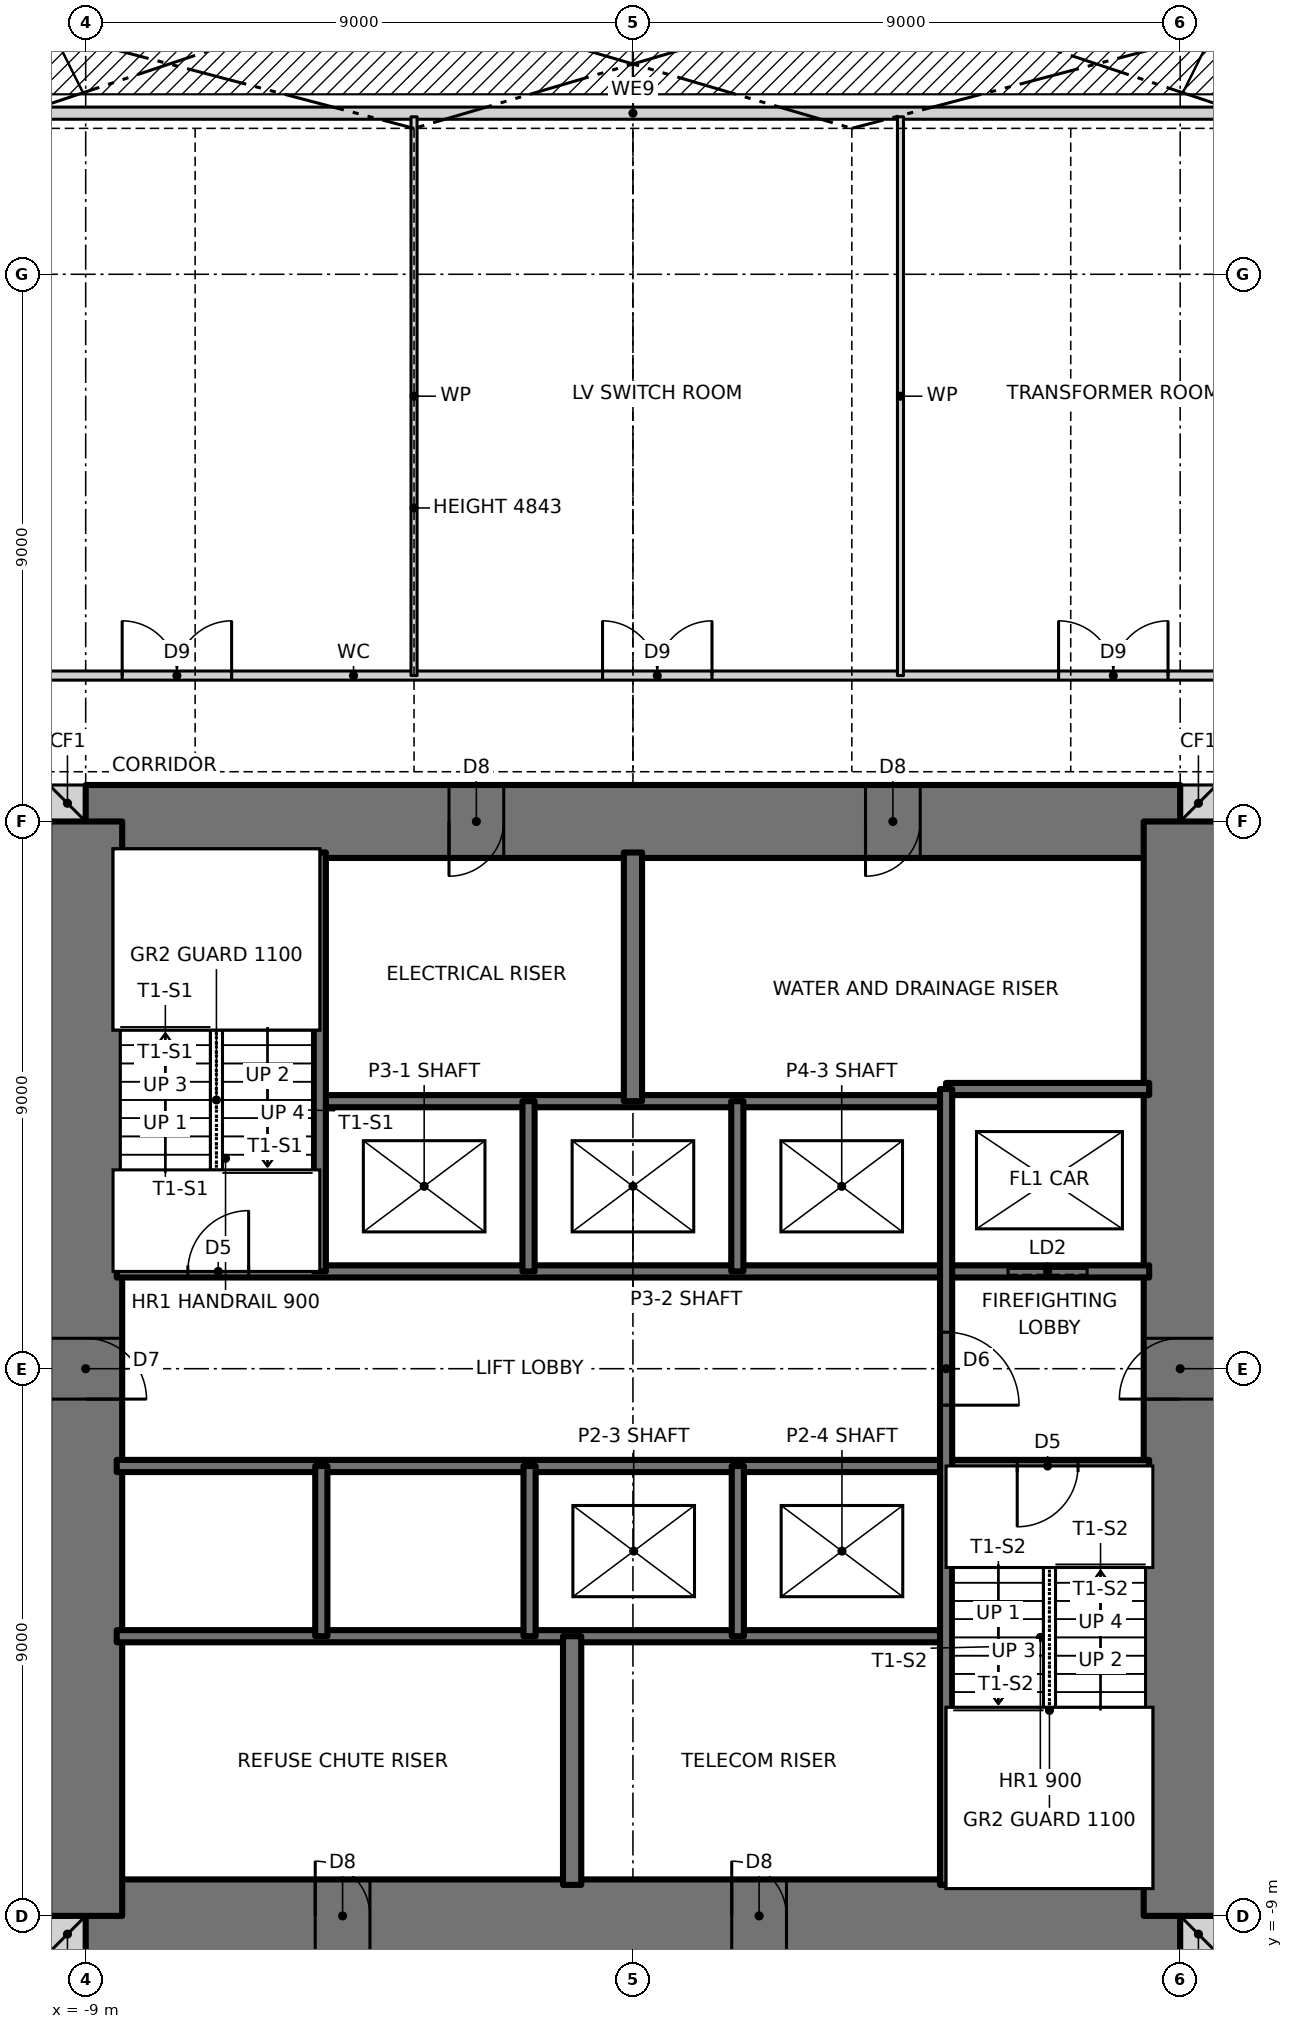
"""IFC4 building model, lengths in metres.
Left out: names, types, materials, properties, quantities, classifications, styles, units other than length and angle.
Written with IfcOpenShell. Run it as: python <this file> out.ifc"""

import sys

from ifc_helpers import new_model, si_unit, direction, frame, frame_2d, origin, origin_2d, place, context, subcontext, project, spatial, rectangle, hollow_rectangle, extrude, clip, halfspace, element, fill, save


model = new_model("IFC4")
c1 = context("Model", 3, precision=1e-05, world=origin(), true_north=direction((0.0, 1.0)))
c2 = subcontext(c1, "Body", "Model", "MODEL_VIEW")
j1 = project(units=[si_unit("LENGTHUNIT", "METRE"), si_unit("PLANEANGLEUNIT", "RADIAN")], contexts=[c1])
p1 = place(None, origin())
s1 = spatial("IfcSite", under=j1, at=p1, CompositionType="ELEMENT")
p2 = place(p1, origin())
s2 = spatial("IfcBuilding", under=s1, at=p2, CompositionType="ELEMENT")
p3 = place(p2, frame((0.0, 0.0, 74.5)))
s3 = spatial("IfcBuildingStorey", under=s2, at=p3, CompositionType="ELEMENT", Elevation=74.5)
p4 = place(p3, frame((4.05, 22.65, 0.0), z_axis=(-0.070044605522, -0.350261033367, 0.934029422311), x_axis=(0.980584767795, -0.196095673508, 0.0)))
e1 = element("IfcColumn", 1, at=p4, inside=s3, PredefinedType="COLUMN", context=c2, shape_type="Clipping", body=[
    clip(clip(extrude(hollow_rectangle(XDim=0.8, YDim=0.8, WallThickness=0.09, at=origin_2d()), origin(), (0.0, 0.0, 1.0), 6.424), halfspace(frame((0.0, 0.0, 0.0), z_axis=(0.0, -0.357196078167, -0.934029422311), x_axis=(0.980584767795, 0.183159128644, -0.070044605522)), False)), halfspace(frame((0.0, 2.143, 5.604), z_axis=(0.0, 0.357196078167, 0.934029422311), x_axis=(0.980584767795, 0.183159128644, -0.070044605522)), False)),
])
p5 = place(p3, frame((-4.05, 22.65, 0.0), z_axis=(0.070044605522, -0.350261033367, 0.934029422311), x_axis=(0.980584767795, 0.196095673508, 0.0)))
e2 = element("IfcColumn", 2, at=p5, inside=s3, PredefinedType="COLUMN", context=c2, shape_type="Clipping", body=[
    clip(clip(extrude(hollow_rectangle(XDim=0.8, YDim=0.8, WallThickness=0.09, at=origin_2d()), origin(), (0.0, 0.0, 1.0), 6.424), halfspace(frame((0.0, 0.0, 0.0), z_axis=(0.0, -0.357196078167, -0.934029422311), x_axis=(0.980584767795, -0.183159128644, 0.070044605522)), False)), halfspace(frame((0.0, 2.143, 5.604), z_axis=(0.0, 0.357196078167, 0.934029422311), x_axis=(0.980584767795, -0.183159128644, 0.070044605522)), False)),
])
for number, where, z_axis, x_axis in (
    (3, (-9.6, -9.3, 0.0), (0.0, 0.0, 1.0), (1.0, 0.0, 0.0)),
    (4, (9.0, -9.3, 0.0), (0.0, 0.0, 1.0), (1.0, 0.0, 0.0)),
    (5, (9.0, 9.3, 0.0), (0.0, 0.0, 1.0), (1.0, 0.0, 0.0)),
    (6, (-9.6, 9.3, 0.0), (0.0, 0.0, 1.0), (1.0, 0.0, 0.0)),
):
    element("IfcWall", number, at=place(p3, frame(where, z_axis=z_axis, x_axis=x_axis)), inside=s3, PredefinedType="SOLIDWALL", context=c2, shape_type="SweptSolid", body=[
        extrude(rectangle(XDim=0.6, YDim=0.6, at=frame_2d((0.3, 0.0))), origin(), (0.0, 0.0, 1.0), 6.0),
    ])
p6 = place(p3, frame((-9.0, -9.0, 0.0), z_axis=(0.0, 0.0, 1.0), x_axis=(1.0, 0.0, 0.0)))
e7 = element("IfcWall", 7, at=p6, inside=s3, PredefinedType="SHEAR", context=c2, shape_type="SweptSolid", body=[
    extrude(rectangle(XDim=18.0, YDim=1.2, at=frame_2d((9.0, 0.0))), origin(), (0.0, 0.0, 1.0), 6.0),
])
p7 = place(p6, frame((3.775, 0.0, 0.0)))
e8 = element("IfcOpeningElement", 8, at=p7, cuts=e7, PredefinedType="OPENING", context=c2, shape_type="SweptSolid", body=[
    extrude(rectangle(XDim=0.9, YDim=2.1, at=frame_2d((0.45, 1.05))), frame((0.0, 0.61, 0.0), z_axis=(0.0, -1.0, 0.0), x_axis=(1.0, 0.0, 0.0)), (0.0, 0.0, 1.0), 1.22),
])
p8 = place(p6, frame((10.625, 0.0, 0.0)))
e9 = element("IfcOpeningElement", 9, at=p8, cuts=e7, PredefinedType="OPENING", context=c2, shape_type="SweptSolid", body=[
    extrude(rectangle(XDim=0.9, YDim=2.1, at=frame_2d((0.45, 1.05))), frame((0.0, 0.61, 0.0), z_axis=(0.0, -1.0, 0.0), x_axis=(1.0, 0.0, 0.0)), (0.0, 0.0, 1.0), 1.22),
])
p9 = place(p3, frame((9.0, 9.0, 0.0), z_axis=(0.0, 0.0, 1.0), x_axis=(-1.0, 0.0, 0.0)))
e10 = element("IfcWall", 10, at=p9, inside=s3, PredefinedType="SHEAR", context=c2, shape_type="SweptSolid", body=[
    extrude(rectangle(XDim=18.0, YDim=1.2, at=frame_2d((9.0, 0.0))), origin(), (0.0, 0.0, 1.0), 6.0),
])
p10 = place(p9, frame((11.125, 0.0, 0.0)))
e11 = element("IfcOpeningElement", 11, at=p10, cuts=e10, PredefinedType="OPENING", context=c2, shape_type="SweptSolid", body=[
    extrude(rectangle(XDim=0.9, YDim=2.1, at=frame_2d((0.45, 1.05))), frame((0.0, 0.61, 0.0), z_axis=(0.0, -1.0, 0.0), x_axis=(1.0, 0.0, 0.0)), (0.0, 0.0, 1.0), 1.22),
])
p11 = place(p9, frame((4.275, 0.0, 0.0)))
e12 = element("IfcOpeningElement", 12, at=p11, cuts=e10, PredefinedType="OPENING", context=c2, shape_type="SweptSolid", body=[
    extrude(rectangle(XDim=0.9, YDim=2.1, at=frame_2d((0.45, 1.05))), frame((0.0, 0.61, 0.0), z_axis=(0.0, -1.0, 0.0), x_axis=(1.0, 0.0, 0.0)), (0.0, 0.0, 1.0), 1.22),
])
p12 = place(p3, frame((9.0, -9.0, 0.0), z_axis=(0.0, 0.0, 1.0), x_axis=(0.0, 1.0, 0.0)))
e13 = element("IfcWall", 13, at=p12, inside=s3, PredefinedType="SHEAR", context=c2, shape_type="SweptSolid", body=[
    extrude(rectangle(XDim=18.0, YDim=1.2, at=frame_2d((9.0, 0.0))), origin(), (0.0, 0.0, 1.0), 6.0),
])
p13 = place(p12, frame((8.5, 0.0, 0.0)))
e14 = element("IfcOpeningElement", 14, at=p13, cuts=e13, PredefinedType="OPENING", context=c2, shape_type="SweptSolid", body=[
    extrude(rectangle(XDim=1.0, YDim=2.1, at=frame_2d((0.5, 1.05))), frame((0.0, 0.61, 0.0), z_axis=(0.0, -1.0, 0.0), x_axis=(1.0, 0.0, 0.0)), (0.0, 0.0, 1.0), 1.22),
])
p14 = place(p3, frame((-9.0, 9.0, 0.0), z_axis=(0.0, 0.0, 1.0), x_axis=(0.0, -1.0, 0.0)))
e15 = element("IfcWall", 15, at=p14, inside=s3, PredefinedType="SHEAR", context=c2, shape_type="SweptSolid", body=[
    extrude(rectangle(XDim=18.0, YDim=1.2, at=frame_2d((9.0, 0.0))), origin(), (0.0, 0.0, 1.0), 6.0),
])
p15 = place(p14, frame((8.5, 0.0, 0.0)))
e16 = element("IfcOpeningElement", 16, at=p15, cuts=e15, PredefinedType="OPENING", context=c2, shape_type="SweptSolid", body=[
    extrude(rectangle(XDim=1.0, YDim=2.1, at=frame_2d((0.5, 1.05))), frame((0.0, 0.61, 0.0), z_axis=(0.0, -1.0, 0.0), x_axis=(1.0, 0.0, 0.0)), (0.0, 0.0, 1.0), 1.22),
])
p16 = place(p3, frame((17.795, 20.65, 0.0), z_axis=(0.0, 0.0, 1.0), x_axis=(-1.0, 0.0, 0.0)))
e17 = element("IfcWall", 17, at=p16, inside=s3, PredefinedType="PARTITIONING", context=c2, shape_type="SweptSolid", body=[
    extrude(rectangle(XDim=35.59, YDim=0.2, at=frame_2d((17.795, 0.0))), origin(), (0.0, 0.0, 1.0), 5.7),
])
p17 = place(p3, frame((-8.49, -4.4, 0.0), z_axis=(0.0, 0.0, 1.0), x_axis=(1.0, 0.0, 0.0)))
e18 = element("IfcWall", 18, at=p17, inside=s3, PredefinedType="SOLIDWALL", context=c2, shape_type="SweptSolid", body=[
    extrude(rectangle(XDim=13.64, YDim=0.2, at=frame_2d((6.82, 0.0))), origin(), (0.0, 0.0, 1.0), 6.0),
])
p18 = place(p3, frame((-8.49, -1.6, 0.0), z_axis=(0.0, 0.0, 1.0), x_axis=(1.0, 0.0, 0.0)))
e19 = element("IfcWall", 19, at=p18, inside=s3, PredefinedType="SOLIDWALL", context=c2, shape_type="SweptSolid", body=[
    extrude(rectangle(XDim=16.98, YDim=0.2, at=frame_2d((8.49, 0.0))), origin(), (0.0, 0.0, 1.0), 6.0),
])
p19 = place(p18, frame((14.81, 0.0, 0.0)))
e20 = element("IfcOpeningElement", 20, at=p19, cuts=e19, PredefinedType="OPENING", context=c2, shape_type="SweptSolid", body=[
    extrude(rectangle(XDim=1.0, YDim=2.1, at=frame_2d((0.5, 1.05))), frame((0.0, 0.11, 0.0), z_axis=(0.0, -1.0, 0.0), x_axis=(1.0, 0.0, 0.0)), (0.0, 0.0, 1.0), 0.22),
])
p20 = place(p3, frame((-8.49, 1.6, 0.0), z_axis=(0.0, 0.0, 1.0), x_axis=(1.0, 0.0, 0.0)))
e21 = element("IfcWall", 21, at=p20, inside=s3, PredefinedType="SOLIDWALL", context=c2, shape_type="SweptSolid", body=[
    extrude(rectangle(XDim=16.98, YDim=0.2, at=frame_2d((8.49, 0.0))), origin(), (0.0, 0.0, 1.0), 6.0),
])
p21 = place(p20, frame((1.17, 0.0, 0.0)))
e22 = element("IfcOpeningElement", 22, at=p21, cuts=e21, PredefinedType="OPENING", context=c2, shape_type="SweptSolid", body=[
    extrude(rectangle(XDim=1.0, YDim=2.1, at=frame_2d((0.5, 1.05))), frame((0.0, 0.11, 0.0), z_axis=(0.0, -1.0, 0.0), x_axis=(1.0, 0.0, 0.0)), (0.0, 0.0, 1.0), 0.22),
])
p22 = place(p20, frame((14.66, 0.0, 0.0)))
e23 = element("IfcOpeningElement", 23, at=p22, cuts=e21, PredefinedType="OPENING", context=c2, shape_type="SweptSolid", body=[
    extrude(rectangle(XDim=1.3, YDim=2.1, at=frame_2d((0.65, 1.05))), frame((0.0, 0.11, 0.0), z_axis=(0.0, -1.0, 0.0), x_axis=(1.0, 0.0, 0.0)), (0.0, 0.0, 1.0), 0.22),
])
p23 = place(p3, frame((-5.15, 4.4, 0.0), z_axis=(0.0, 0.0, 1.0), x_axis=(1.0, 0.0, 0.0)))
e24 = element("IfcWall", 24, at=p23, inside=s3, PredefinedType="SOLIDWALL", context=c2, shape_type="SweptSolid", body=[
    extrude(rectangle(XDim=10.3, YDim=0.2, at=frame_2d((5.15, 0.0))), origin(), (0.0, 0.0, 1.0), 6.0),
])
p24 = place(p3, frame((5.15, 4.6, 0.0), z_axis=(0.0, 0.0, 1.0), x_axis=(1.0, 0.0, 0.0)))
e25 = element("IfcWall", 25, at=p24, inside=s3, PredefinedType="SOLIDWALL", context=c2, shape_type="SweptSolid", body=[
    extrude(rectangle(XDim=3.34, YDim=0.2, at=frame_2d((1.67, 0.0))), origin(), (0.0, 0.0, 1.0), 6.0),
])
p25 = place(p3, frame((-20.59, 11.4, 0.0), z_axis=(0.0, 0.0, 1.0), x_axis=(1.0, 0.0, 0.0)))
e26 = element("IfcWall", 26, at=p25, inside=s3, PredefinedType="PARTITIONING", context=c2, shape_type="SweptSolid", body=[
    extrude(rectangle(XDim=31.99, YDim=0.15, at=frame_2d((15.995, 0.0))), origin(), (0.0, 0.0, 1.0), 5.77),
])
p26 = place(p25, frame((27.59, 0.0, 0.0)))
e27 = element("IfcOpeningElement", 27, at=p26, cuts=e26, PredefinedType="OPENING", context=c2, shape_type="SweptSolid", body=[
    extrude(rectangle(XDim=1.8, YDim=2.1, at=frame_2d((0.9, 1.05))), frame((0.0, 0.085, 0.0), z_axis=(0.0, -1.0, 0.0), x_axis=(1.0, 0.0, 0.0)), (0.0, 0.0, 1.0), 0.17),
])
p27 = place(p25, frame((20.09, 0.0, 0.0)))
e28 = element("IfcOpeningElement", 28, at=p27, cuts=e26, PredefinedType="OPENING", context=c2, shape_type="SweptSolid", body=[
    extrude(rectangle(XDim=1.8, YDim=2.1, at=frame_2d((0.9, 1.05))), frame((0.0, 0.085, 0.0), z_axis=(0.0, -1.0, 0.0), x_axis=(1.0, 0.0, 0.0)), (0.0, 0.0, 1.0), 0.17),
])
p28 = place(p25, frame((12.19, 0.0, 0.0)))
e29 = element("IfcOpeningElement", 29, at=p28, cuts=e26, PredefinedType="OPENING", context=c2, shape_type="SweptSolid", body=[
    extrude(rectangle(XDim=1.8, YDim=2.1, at=frame_2d((0.9, 1.05))), frame((0.0, 0.085, 0.0), z_axis=(0.0, -1.0, 0.0), x_axis=(1.0, 0.0, 0.0)), (0.0, 0.0, 1.0), 0.17),
])
p29 = place(p3, frame((5.15, -8.49, 0.0), z_axis=(0.0, 0.0, 1.0), x_axis=(0.0, 1.0, 0.0)))
e30 = element("IfcWall", 30, at=p29, inside=s3, PredefinedType="SOLIDWALL", context=c2, shape_type="SweptSolid", body=[
    extrude(rectangle(XDim=13.09, YDim=0.2, at=frame_2d((6.545, 0.0))), origin(), (0.0, 0.0, 1.0), 6.0),
])
p30 = place(p29, frame((7.89, 0.0, 0.0)))
e31 = element("IfcOpeningElement", 31, at=p30, cuts=e30, PredefinedType="OPENING", context=c2, shape_type="SweptSolid", body=[
    extrude(rectangle(XDim=1.2, YDim=2.1, at=frame_2d((0.6, 1.05))), frame((0.0, 0.11, 0.0), z_axis=(0.0, -1.0, 0.0), x_axis=(1.0, 0.0, 0.0)), (0.0, 0.0, 1.0), 0.22),
])
p31 = place(p3, frame((4.4, 11.4, 0.0), z_axis=(0.0, 0.0, 1.0), x_axis=(0.0, 1.0, 0.0)))
e32 = element("IfcWall", 32, at=p31, inside=s3, PredefinedType="PARTITIONING", context=c2, shape_type="SweptSolid", body=[
    extrude(rectangle(XDim=9.19, YDim=0.1, at=frame_2d((4.595, 0.0))), origin(), (0.0, 0.0, 1.0), 5.77),
])
for number, where, z_axis, x_axis in (
    (33, (1.725, -4.4, 0.0), (0.0, 0.0, 1.0), (0.0, 1.0, 0.0)),
    (34, (1.717, 1.6, 0.0), (0.0, 0.0, 1.0), (0.0, 1.0, 0.0)),
):
    element("IfcWall", number, at=place(p3, frame(where, z_axis=z_axis, x_axis=x_axis)), inside=s3, PredefinedType="SOLIDWALL", context=c2, shape_type="SweptSolid", body=[
        extrude(rectangle(XDim=2.8, YDim=0.2, at=frame_2d((1.4, 0.0))), origin(), (0.0, 0.0, 1.0), 6.0),
    ])
for number, where, z_axis, x_axis in (
    (35, (0.0, 4.4, 0.0), (0.0, 0.0, 1.0), (0.0, 1.0, 0.0)),
    (36, (-1.0, -8.49, 0.0), (0.0, 0.0, 1.0), (0.0, 1.0, 0.0)),
):
    element("IfcWall", number, at=place(p3, frame(where, z_axis=z_axis, x_axis=x_axis)), inside=s3, PredefinedType="SOLIDWALL", context=c2, shape_type="SweptSolid", body=[
        extrude(rectangle(XDim=4.09, YDim=0.3, at=frame_2d((2.045, 0.0))), origin(), (0.0, 0.0, 1.0), 6.0),
    ])
for number, where, z_axis, x_axis in (
    (37, (-1.7, -4.4, 0.0), (0.0, 0.0, 1.0), (0.0, 1.0, 0.0)),
    (38, (-1.717, 1.6, 0.0), (0.0, 0.0, 1.0), (0.0, 1.0, 0.0)),
):
    element("IfcWall", number, at=place(p3, frame(where, z_axis=z_axis, x_axis=x_axis)), inside=s3, PredefinedType="SOLIDWALL", context=c2, shape_type="SweptSolid", body=[
        extrude(rectangle(XDim=2.8, YDim=0.2, at=frame_2d((1.4, 0.0))), origin(), (0.0, 0.0, 1.0), 6.0),
    ])
p32 = place(p3, frame((-3.6, 11.4, 0.0), z_axis=(0.0, 0.0, 1.0), x_axis=(0.0, 1.0, 0.0)))
e39 = element("IfcWall", 39, at=p32, inside=s3, PredefinedType="PARTITIONING", context=c2, shape_type="SweptSolid", body=[
    extrude(rectangle(XDim=9.19, YDim=0.1, at=frame_2d((4.595, 0.0))), origin(), (0.0, 0.0, 1.0), 4.843),
])
p33 = place(p3, frame((-5.125, -4.4, 0.0), z_axis=(0.0, 0.0, 1.0), x_axis=(0.0, 1.0, 0.0)))
e40 = element("IfcWall", 40, at=p33, inside=s3, PredefinedType="SOLIDWALL", context=c2, shape_type="SweptSolid", body=[
    extrude(rectangle(XDim=2.8, YDim=0.2, at=frame_2d((1.4, 0.0))), origin(), (0.0, 0.0, 1.0), 6.0),
])
p34 = place(p3, frame((-5.15, 1.6, 0.0), z_axis=(0.0, 0.0, 1.0), x_axis=(0.0, 1.0, 0.0)))
e41 = element("IfcWall", 41, at=p34, inside=s3, PredefinedType="SOLIDWALL", context=c2, shape_type="SweptSolid", body=[
    extrude(rectangle(XDim=6.89, YDim=0.2, at=frame_2d((3.445, 0.0))), origin(), (0.0, 0.0, 1.0), 6.0),
])
p35 = place(p21, origin())
e42 = element("IfcDoor", 42, at=p35, inside=s3, OperationType="SINGLE_SWING_RIGHT", PredefinedType="DOOR", context=c2, shape_type="SweptSolid", body=[
    extrude(rectangle(XDim=1.0, YDim=2.1, at=frame_2d((0.5, 1.05))), frame((0.0, 0.025, 0.0), z_axis=(0.0, -1.0, 0.0), x_axis=(1.0, 0.0, 0.0)), (0.0, 0.0, 1.0), 0.05),
])
fill(e22, e42)
p36 = place(p19, frame((1.0, 0.0, 0.0), z_axis=(0.0, 0.0, 1.0), x_axis=(-1.0, 0.0, 0.0)))
e43 = element("IfcDoor", 43, at=p36, inside=s3, OperationType="SINGLE_SWING_RIGHT", PredefinedType="DOOR", context=c2, shape_type="SweptSolid", body=[
    extrude(rectangle(XDim=1.0, YDim=2.1, at=frame_2d((0.5, 1.05))), frame((0.0, 0.025, 0.0), z_axis=(0.0, -1.0, 0.0), x_axis=(1.0, 0.0, 0.0)), (0.0, 0.0, 1.0), 0.05),
])
fill(e20, e43)
p37 = place(p30, frame((1.2, 0.0, 0.0), z_axis=(0.0, 0.0, 1.0), x_axis=(-1.0, 0.0, 0.0)))
e44 = element("IfcDoor", 44, at=p37, inside=s3, OperationType="SINGLE_SWING_RIGHT", PredefinedType="DOOR", context=c2, shape_type="SweptSolid", body=[
    extrude(rectangle(XDim=1.2, YDim=2.1, at=frame_2d((0.6, 1.05))), frame((0.0, 0.025, 0.0), z_axis=(0.0, -1.0, 0.0), x_axis=(1.0, 0.0, 0.0)), (0.0, 0.0, 1.0), 0.05),
])
fill(e31, e44)
p38 = place(p26, origin())
e45 = element("IfcDoor", 45, at=p38, inside=s3, OperationType="DOUBLE_DOOR_SINGLE_SWING", PredefinedType="DOOR", context=c2, shape_type="SweptSolid", body=[
    extrude(rectangle(XDim=1.8, YDim=2.1, at=frame_2d((0.9, 1.05))), frame((0.0, 0.025, 0.0), z_axis=(0.0, -1.0, 0.0), x_axis=(1.0, 0.0, 0.0)), (0.0, 0.0, 1.0), 0.05),
])
fill(e27, e45)
p39 = place(p27, origin())
e46 = element("IfcDoor", 46, at=p39, inside=s3, OperationType="DOUBLE_DOOR_SINGLE_SWING", PredefinedType="DOOR", context=c2, shape_type="SweptSolid", body=[
    extrude(rectangle(XDim=1.8, YDim=2.1, at=frame_2d((0.9, 1.05))), frame((0.0, 0.025, 0.0), z_axis=(0.0, -1.0, 0.0), x_axis=(1.0, 0.0, 0.0)), (0.0, 0.0, 1.0), 0.05),
])
fill(e28, e46)
p40 = place(p28, origin())
e47 = element("IfcDoor", 47, at=p40, inside=s3, OperationType="DOUBLE_DOOR_SINGLE_SWING", PredefinedType="DOOR", context=c2, shape_type="SweptSolid", body=[
    extrude(rectangle(XDim=1.8, YDim=2.1, at=frame_2d((0.9, 1.05))), frame((0.0, 0.025, 0.0), z_axis=(0.0, -1.0, 0.0), x_axis=(1.0, 0.0, 0.0)), (0.0, 0.0, 1.0), 0.05),
])
fill(e29, e47)
p41 = place(p15, origin())
e48 = element("IfcDoor", 48, at=p41, inside=s3, OperationType="SINGLE_SWING_RIGHT", PredefinedType="DOOR", context=c2, shape_type="SweptSolid", body=[
    extrude(rectangle(XDim=1.0, YDim=2.1, at=frame_2d((0.5, 1.05))), frame((0.0, 0.025, 0.0), z_axis=(0.0, -1.0, 0.0), x_axis=(1.0, 0.0, 0.0)), (0.0, 0.0, 1.0), 0.05),
])
fill(e16, e48)
p42 = place(p13, origin())
e49 = element("IfcDoor", 49, at=p42, inside=s3, OperationType="SINGLE_SWING_LEFT", PredefinedType="DOOR", context=c2, shape_type="SweptSolid", body=[
    extrude(rectangle(XDim=1.0, YDim=2.1, at=frame_2d((0.5, 1.05))), frame((0.0, 0.025, 0.0), z_axis=(0.0, -1.0, 0.0), x_axis=(1.0, 0.0, 0.0)), (0.0, 0.0, 1.0), 0.05),
])
fill(e14, e49)
p43 = place(p10, origin())
e50 = element("IfcDoor", 50, at=p43, inside=s3, OperationType="SINGLE_SWING_RIGHT", PredefinedType="DOOR", context=c2, shape_type="SweptSolid", body=[
    extrude(rectangle(XDim=0.9, YDim=2.1, at=frame_2d((0.45, 1.05))), frame((0.0, 0.025, 0.0), z_axis=(0.0, -1.0, 0.0), x_axis=(1.0, 0.0, 0.0)), (0.0, 0.0, 1.0), 0.05),
])
fill(e11, e50)
p44 = place(p11, origin())
e51 = element("IfcDoor", 51, at=p44, inside=s3, OperationType="SINGLE_SWING_RIGHT", PredefinedType="DOOR", context=c2, shape_type="SweptSolid", body=[
    extrude(rectangle(XDim=0.9, YDim=2.1, at=frame_2d((0.45, 1.05))), frame((0.0, 0.025, 0.0), z_axis=(0.0, -1.0, 0.0), x_axis=(1.0, 0.0, 0.0)), (0.0, 0.0, 1.0), 0.05),
])
fill(e12, e51)
p45 = place(p7, origin())
e52 = element("IfcDoor", 52, at=p45, inside=s3, OperationType="SINGLE_SWING_LEFT", PredefinedType="DOOR", context=c2, shape_type="SweptSolid", body=[
    extrude(rectangle(XDim=0.9, YDim=2.1, at=frame_2d((0.45, 1.05))), frame((0.0, 0.025, 0.0), z_axis=(0.0, -1.0, 0.0), x_axis=(1.0, 0.0, 0.0)), (0.0, 0.0, 1.0), 0.05),
])
fill(e8, e52)
p46 = place(p8, origin())
e53 = element("IfcDoor", 53, at=p46, inside=s3, OperationType="SINGLE_SWING_LEFT", PredefinedType="DOOR", context=c2, shape_type="SweptSolid", body=[
    extrude(rectangle(XDim=0.9, YDim=2.1, at=frame_2d((0.45, 1.05))), frame((0.0, 0.025, 0.0), z_axis=(0.0, -1.0, 0.0), x_axis=(1.0, 0.0, 0.0)), (0.0, 0.0, 1.0), 0.05),
])
fill(e9, e53)
p47 = place(p22, origin())
e54 = element("IfcDoor", 54, at=p47, inside=s3, OperationType="SLIDING_TO_LEFT", PredefinedType="DOOR", context=c2, shape_type="SweptSolid", body=[
    extrude(rectangle(XDim=1.3, YDim=2.1, at=frame_2d((0.65, 1.05))), frame((0.0, 0.025, 0.0), z_axis=(0.0, -1.0, 0.0), x_axis=(1.0, 0.0, 0.0)), (0.0, 0.0, 1.0), 0.05),
])
fill(e23, e54)
save(model, sys.argv[1])
